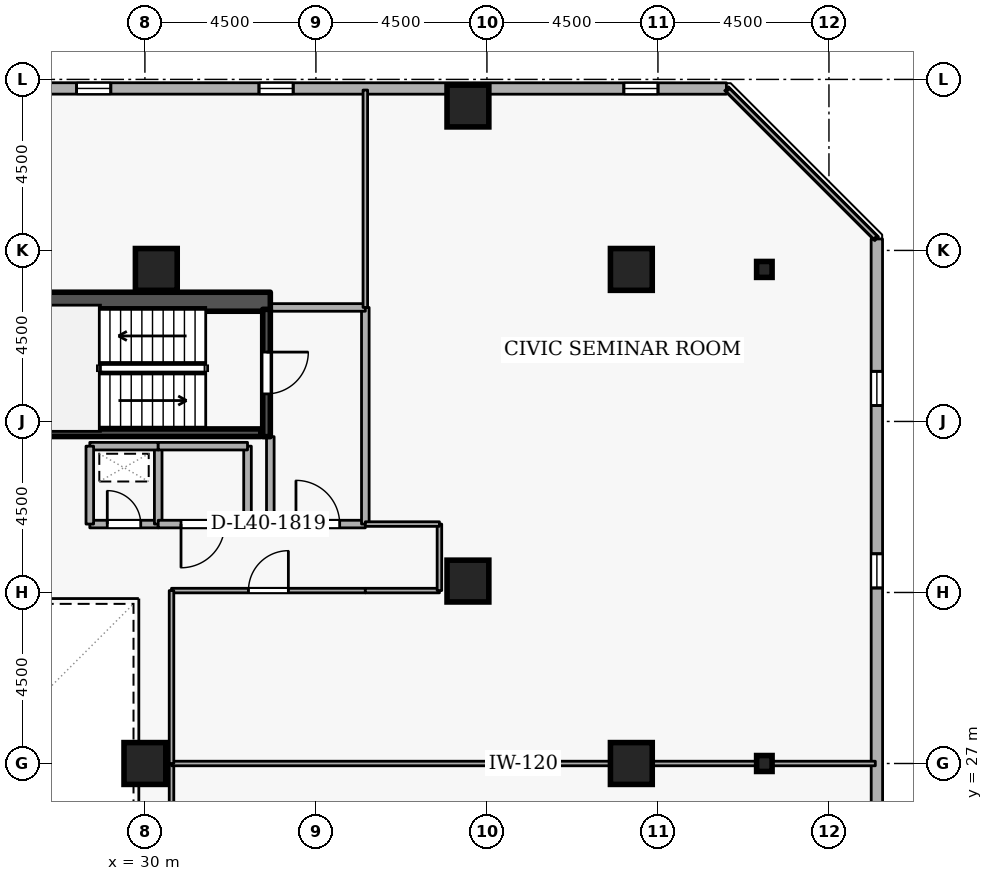
"""IFC4 building model, lengths in metres.
Left out: names, types, materials, properties, quantities, classifications, styles, units other than length and angle.
Written with IfcOpenShell. Run it as: python <this file> out.ifc"""

import sys

from ifc_helpers import new_model, si_unit, direction, frame, frame_2d, origin, origin_2d, place, context, subcontext, project, spatial, rectangle, i_section, extrude, element, fill, save


model = new_model("IFC4")
c1 = context("Model", 3, precision=1e-05, world=origin(), true_north=direction((0.0, 1.0)))
c2 = subcontext(c1, "Body", "Model", "MODEL_VIEW")
j1 = project(units=[si_unit("LENGTHUNIT", "METRE"), si_unit("PLANEANGLEUNIT", "RADIAN")], contexts=[c1])
p1 = place(None, origin())
s1 = spatial("IfcSite", under=j1, at=p1, CompositionType="ELEMENT")
p2 = place(p1, origin())
s2 = spatial("IfcBuilding", under=s1, at=p2, CompositionType="ELEMENT")
p3 = place(p2, frame((0.0, 0.0, 152.7)))
s3 = spatial("IfcBuildingStorey", under=s2, at=p3, CompositionType="ELEMENT", Elevation=152.7)
p4 = place(p3, frame((17.7, 39.15, 0.0), z_axis=(0.0, 0.0, 1.0), x_axis=(1.0, 0.0, 0.0)))
e1 = element("IfcWall", 1, at=p4, inside=s3, PredefinedType="SHEAR", context=c2, shape_type="SweptSolid", body=[
    extrude(rectangle(XDim=15.6, YDim=0.5, at=frame_2d((7.8, 0.0))), origin(), (0.0, 0.0, 1.0), 3.6),
])
for number, where, z_axis, x_axis in (
    (2, (42.8, 27.0, 0.0), (0.0, 0.0, 1.0), (1.0, 0.0, 0.0)),
    (3, (42.8, 40.0, 0.0), (0.0, 0.0, 1.0), (1.0, 0.0, 0.0)),
    (4, (38.5, 44.3, 0.0), (0.0, 0.0, 1.0), (1.0, 0.0, 0.0)),
    (5, (38.5, 31.8, 0.0), (0.0, 0.0, 1.0), (1.0, 0.0, 0.0)),
    (6, (30.3, 40.0, 0.0), (0.0, 0.0, 1.0), (1.0, 0.0, 0.0)),
    (7, (30.0, 27.0, 0.0), (0.0, 0.0, 1.0), (1.0, 0.0, 0.0)),
):
    element("IfcColumn", number, at=place(p3, frame(where, z_axis=z_axis, x_axis=x_axis)), inside=s3, PredefinedType="COLUMN", context=c2, shape_type="SweptSolid", body=[
        extrude(rectangle(XDim=1.1, YDim=1.1, at=origin_2d()), origin(), (0.0, 0.0, 1.0), 3.6),
    ])
for number, where, z_axis, x_axis in (
    (8, (46.3, 27.0, 0.0), (0.0, 0.0, 1.0), (1.0, 0.0, 0.0)),
    (9, (46.3, 40.0, 0.0), (0.0, 0.0, 1.0), (1.0, 0.0, 0.0)),
):
    element("IfcColumn", number, at=place(p3, frame(where, z_axis=z_axis, x_axis=x_axis)), inside=s3, PredefinedType="COLUMN", context=c2, shape_type="SweptSolid", body=[
        extrude(i_section(OverallWidth=0.407, OverallDepth=0.419, WebThickness=0.031, FlangeThickness=0.049, FilletRadius=0.015, at=origin_2d()), origin(), (0.0, 0.0, 1.0), 3.6),
    ])
p5 = place(p3, frame((49.265, 5.819, 0.0), z_axis=(0.0, 0.0, 1.0), x_axis=(-0.000132597301, 0.999999991209, 0.0)))
e10 = element("IfcWall", 10, at=p5, inside=s3, PredefinedType="STANDARD", context=c2, shape_type="SweptSolid", body=[
    extrude(rectangle(XDim=34.983, YDim=0.3, at=frame_2d((17.492, 0.0))), origin(), (0.0, 0.0, 1.0), 2.7),
])
p6 = place(p5, frame((1.8, 0.0, 0.72)))
e11 = element("IfcOpeningElement", 11, at=p6, cuts=e10, PredefinedType="OPENING", context=c2, shape_type="SweptSolid", body=[
    extrude(rectangle(XDim=0.9, YDim=1.75, at=frame_2d((0.45, 0.875))), frame((0.0, 0.16, 0.0), z_axis=(0.0, -1.0, 0.0), x_axis=(1.0, 0.0, 0.0)), (0.0, 0.0, 1.0), 0.32),
])
p7 = place(p5, frame((6.6, 0.0, 0.72)))
e12 = element("IfcOpeningElement", 12, at=p7, cuts=e10, PredefinedType="OPENING", context=c2, shape_type="SweptSolid", body=[
    extrude(rectangle(XDim=0.9, YDim=1.75, at=frame_2d((0.45, 0.875))), frame((0.0, 0.16, 0.0), z_axis=(0.0, -1.0, 0.0), x_axis=(1.0, 0.0, 0.0)), (0.0, 0.0, 1.0), 0.32),
])
p8 = place(p5, frame((11.4, 0.0, 0.72)))
e13 = element("IfcOpeningElement", 13, at=p8, cuts=e10, PredefinedType="OPENING", context=c2, shape_type="SweptSolid", body=[
    extrude(rectangle(XDim=0.9, YDim=1.75, at=frame_2d((0.45, 0.875))), frame((0.0, 0.16, 0.0), z_axis=(0.0, -1.0, 0.0), x_axis=(1.0, 0.0, 0.0)), (0.0, 0.0, 1.0), 0.32),
])
p9 = place(p5, frame((16.2, 0.0, 0.72)))
e14 = element("IfcOpeningElement", 14, at=p9, cuts=e10, PredefinedType="OPENING", context=c2, shape_type="SweptSolid", body=[
    extrude(rectangle(XDim=0.9, YDim=1.75, at=frame_2d((0.45, 0.875))), frame((0.0, 0.16, 0.0), z_axis=(0.0, -1.0, 0.0), x_axis=(1.0, 0.0, 0.0)), (0.0, 0.0, 1.0), 0.32),
])
p10 = place(p5, frame((25.8, 0.0, 0.72)))
e15 = element("IfcOpeningElement", 15, at=p10, cuts=e10, PredefinedType="OPENING", context=c2, shape_type="SweptSolid", body=[
    extrude(rectangle(XDim=0.9, YDim=1.75, at=frame_2d((0.45, 0.875))), frame((0.0, 0.16, 0.0), z_axis=(0.0, -1.0, 0.0), x_axis=(1.0, 0.0, 0.0)), (0.0, 0.0, 1.0), 0.32),
])
p11 = place(p5, frame((30.6, 0.0, 0.72)))
e16 = element("IfcOpeningElement", 16, at=p11, cuts=e10, PredefinedType="OPENING", context=c2, shape_type="SweptSolid", body=[
    extrude(rectangle(XDim=0.9, YDim=1.75, at=frame_2d((0.45, 0.875))), frame((0.0, 0.16, 0.0), z_axis=(0.0, -1.0, 0.0), x_axis=(1.0, 0.0, 0.0)), (0.0, 0.0, 1.0), 0.32),
])
p12 = place(p3, frame((45.302, 44.76, 0.0), z_axis=(0.0, 0.0, 1.0), x_axis=(-0.999999991209, 0.000132597301, 0.0)))
e17 = element("IfcWall", 17, at=p12, inside=s3, PredefinedType="STANDARD", context=c2, shape_type="SweptSolid", body=[
    extrude(rectangle(XDim=34.983, YDim=0.3, at=frame_2d((17.492, 0.0))), origin(), (0.0, 0.0, 1.0), 2.7),
])
p13 = place(p12, frame((1.8, 0.0, 0.72)))
e18 = element("IfcOpeningElement", 18, at=p13, cuts=e17, PredefinedType="OPENING", context=c2, shape_type="SweptSolid", body=[
    extrude(rectangle(XDim=0.9, YDim=1.75, at=frame_2d((0.45, 0.875))), frame((0.0, 0.16, 0.0), z_axis=(0.0, -1.0, 0.0), x_axis=(1.0, 0.0, 0.0)), (0.0, 0.0, 1.0), 0.32),
])
p14 = place(p12, frame((11.4, 0.0, 0.72)))
e19 = element("IfcOpeningElement", 19, at=p14, cuts=e17, PredefinedType="OPENING", context=c2, shape_type="SweptSolid", body=[
    extrude(rectangle(XDim=0.9, YDim=1.75, at=frame_2d((0.45, 0.875))), frame((0.0, 0.16, 0.0), z_axis=(0.0, -1.0, 0.0), x_axis=(1.0, 0.0, 0.0)), (0.0, 0.0, 1.0), 0.32),
])
p15 = place(p12, frame((16.2, 0.0, 0.72)))
e20 = element("IfcOpeningElement", 20, at=p15, cuts=e17, PredefinedType="OPENING", context=c2, shape_type="SweptSolid", body=[
    extrude(rectangle(XDim=0.9, YDim=1.75, at=frame_2d((0.45, 0.875))), frame((0.0, 0.16, 0.0), z_axis=(0.0, -1.0, 0.0), x_axis=(1.0, 0.0, 0.0)), (0.0, 0.0, 1.0), 0.32),
])
p16 = place(p12, frame((21.0, 0.0, 0.72)))
e21 = element("IfcOpeningElement", 21, at=p16, cuts=e17, PredefinedType="OPENING", context=c2, shape_type="SweptSolid", body=[
    extrude(rectangle(XDim=0.9, YDim=1.75, at=frame_2d((0.45, 0.875))), frame((0.0, 0.16, 0.0), z_axis=(0.0, -1.0, 0.0), x_axis=(1.0, 0.0, 0.0)), (0.0, 0.0, 1.0), 0.32),
])
p17 = place(p12, frame((25.8, 0.0, 0.72)))
e22 = element("IfcOpeningElement", 22, at=p17, cuts=e17, PredefinedType="OPENING", context=c2, shape_type="SweptSolid", body=[
    extrude(rectangle(XDim=0.9, YDim=1.75, at=frame_2d((0.45, 0.875))), frame((0.0, 0.16, 0.0), z_axis=(0.0, -1.0, 0.0), x_axis=(1.0, 0.0, 0.0)), (0.0, 0.0, 1.0), 0.32),
])
p18 = place(p12, frame((30.6, 0.0, 0.72)))
e23 = element("IfcOpeningElement", 23, at=p18, cuts=e17, PredefinedType="OPENING", context=c2, shape_type="SweptSolid", body=[
    extrude(rectangle(XDim=0.9, YDim=1.75, at=frame_2d((0.45, 0.875))), frame((0.0, 0.16, 0.0), z_axis=(0.0, -1.0, 0.0), x_axis=(1.0, 0.0, 0.0)), (0.0, 0.0, 1.0), 0.32),
])
p19 = place(p3, frame((33.2, 38.95, 0.0), z_axis=(0.0, 0.0, 1.0), x_axis=(0.0, -1.0, 0.0)))
e24 = element("IfcWall", 24, at=p19, inside=s3, PredefinedType="SHEAR", context=c2, shape_type="SweptSolid", body=[
    extrude(rectangle(XDim=3.35, YDim=0.2, at=frame_2d((1.675, 0.0))), origin(), (0.0, 0.0, 1.0), 3.6),
])
p20 = place(p19, frame((1.125, 0.0, 0.0)))
e25 = element("IfcOpeningElement", 25, at=p20, cuts=e24, PredefinedType="OPENING", context=c2, shape_type="SweptSolid", body=[
    extrude(rectangle(XDim=1.1, YDim=2.1, at=frame_2d((0.55, 1.05))), frame((0.0, 0.11, 0.0), z_axis=(0.0, -1.0, 0.0), x_axis=(1.0, 0.0, 0.0)), (0.0, 0.0, 1.0), 0.22),
])
p21 = place(p3, frame((25.95, 35.703, 0.0), z_axis=(0.0, 0.0, 1.0), x_axis=(1.0, 0.0, 0.0)))
e26 = element("IfcWall", 26, at=p21, inside=s3, PredefinedType="SHEAR", context=c2, shape_type="SweptSolid", body=[
    extrude(rectangle(XDim=7.1, YDim=0.2, at=frame_2d((3.55, 0.0))), origin(), (0.0, 0.0, 1.0), 3.6),
])
p22 = place(p3, frame((33.3, 33.3, 0.0), z_axis=(0.0, 0.0, 1.0), x_axis=(1.0, 0.0, 0.0)))
e27 = element("IfcWall", 27, at=p22, inside=s3, PredefinedType="STANDARD", context=c2, shape_type="SweptSolid", body=[
    extrude(rectangle(XDim=2.5, YDim=0.2, at=frame_2d((1.25, 0.0))), origin(), (0.0, 0.0, 1.0), 3.34),
])
p23 = place(p22, frame((0.675, 0.0, 0.0)))
e28 = element("IfcOpeningElement", 28, at=p23, cuts=e27, PredefinedType="OPENING", context=c2, shape_type="SweptSolid", body=[
    extrude(rectangle(XDim=1.15, YDim=2.1, at=frame_2d((0.575, 1.05))), frame((0.0, 0.11, 0.0), z_axis=(0.0, -1.0, 0.0), x_axis=(1.0, 0.0, 0.0)), (0.0, 0.0, 1.0), 0.22),
])
p24 = place(p3, frame((35.8, 33.3, 0.0), z_axis=(0.0, 0.0, 1.0), x_axis=(0.0, 1.0, 0.0)))
e29 = element("IfcWall", 29, at=p24, inside=s3, PredefinedType="STANDARD", context=c2, shape_type="SweptSolid", body=[
    extrude(rectangle(XDim=5.7, YDim=0.2, at=frame_2d((2.85, 0.0))), origin(), (0.0, 0.0, 1.0), 3.34),
])
p25 = place(p3, frame((35.8, 39.0, 0.0), z_axis=(0.0, 0.0, 1.0), x_axis=(-1.0, 0.0, 0.0)))
e30 = element("IfcWall", 30, at=p25, inside=s3, PredefinedType="STANDARD", context=c2, shape_type="SweptSolid", body=[
    extrude(rectangle(XDim=2.5, YDim=0.2, at=frame_2d((1.25, 0.0))), origin(), (0.0, 0.0, 1.0), 3.34),
])
p26 = place(p3, frame((33.3, 35.6, 0.0), z_axis=(0.0, 0.0, 1.0), x_axis=(0.0, -1.0, 0.0)))
e31 = element("IfcWall", 31, at=p26, inside=s3, PredefinedType="STANDARD", context=c2, shape_type="SweptSolid", body=[
    extrude(rectangle(XDim=2.3, YDim=0.2, at=frame_2d((1.15, 0.0))), origin(), (0.0, 0.0, 1.0), 2.545),
])
p27 = place(p3, frame((28.55, 33.3, 0.0), z_axis=(0.0, 0.0, 1.0), x_axis=(1.0, 0.0, 0.0)))
e32 = element("IfcWall", 32, at=p27, inside=s3, PredefinedType="STANDARD", context=c2, shape_type="SweptSolid", body=[
    extrude(rectangle(XDim=1.8, YDim=0.2, at=frame_2d((0.9, 0.0))), origin(), (0.0, 0.0, 1.0), 3.34),
])
p28 = place(p27, frame((0.46, 0.0, 0.0)))
e33 = element("IfcOpeningElement", 33, at=p28, cuts=e32, PredefinedType="OPENING", context=c2, shape_type="SweptSolid", body=[
    extrude(rectangle(XDim=0.88, YDim=2.04, at=frame_2d((0.44, 1.02))), frame((0.0, 0.11, 0.0), z_axis=(0.0, -1.0, 0.0), x_axis=(1.0, 0.0, 0.0)), (0.0, 0.0, 1.0), 0.22),
])
p29 = place(p3, frame((30.35, 33.3, 0.0), z_axis=(0.0, 0.0, 1.0), x_axis=(0.0, 1.0, 0.0)))
e34 = element("IfcWall", 34, at=p29, inside=s3, PredefinedType="STANDARD", context=c2, shape_type="SweptSolid", body=[
    extrude(rectangle(XDim=2.05, YDim=0.2, at=frame_2d((1.025, 0.0))), origin(), (0.0, 0.0, 1.0), 3.34),
])
p30 = place(p3, frame((30.35, 35.35, 0.0), z_axis=(0.0, 0.0, 1.0), x_axis=(-1.0, 0.0, 0.0)))
e35 = element("IfcWall", 35, at=p30, inside=s3, PredefinedType="STANDARD", context=c2, shape_type="SweptSolid", body=[
    extrude(rectangle(XDim=1.8, YDim=0.2, at=frame_2d((0.9, 0.0))), origin(), (0.0, 0.0, 1.0), 3.34),
])
p31 = place(p3, frame((28.55, 35.35, 0.0), z_axis=(0.0, 0.0, 1.0), x_axis=(0.0, -1.0, 0.0)))
e36 = element("IfcWall", 36, at=p31, inside=s3, PredefinedType="STANDARD", context=c2, shape_type="SweptSolid", body=[
    extrude(rectangle(XDim=2.05, YDim=0.2, at=frame_2d((1.025, 0.0))), origin(), (0.0, 0.0, 1.0), 3.34),
])
p32 = place(p3, frame((32.7, 35.35, 0.0), z_axis=(0.0, 0.0, 1.0), x_axis=(0.0, -1.0, 0.0)))
e37 = element("IfcWall", 37, at=p32, inside=s3, PredefinedType="STANDARD", context=c2, shape_type="SweptSolid", body=[
    extrude(rectangle(XDim=2.05, YDim=0.2, at=frame_2d((1.025, 0.0))), origin(), (0.0, 0.0, 1.0), 2.545),
])
p33 = place(p3, frame((32.7, 33.3, 0.0), z_axis=(0.0, 0.0, 1.0), x_axis=(-1.0, 0.0, 0.0)))
e38 = element("IfcWall", 38, at=p33, inside=s3, PredefinedType="STANDARD", context=c2, shape_type="SweptSolid", body=[
    extrude(rectangle(XDim=2.35, YDim=0.2, at=frame_2d((1.175, 0.0))), origin(), (0.0, 0.0, 1.0), 3.34),
])
p34 = place(p33, frame((0.6, 0.0, 0.0)))
e39 = element("IfcOpeningElement", 39, at=p34, cuts=e38, PredefinedType="OPENING", context=c2, shape_type="SweptSolid", body=[
    extrude(rectangle(XDim=1.15, YDim=2.1, at=frame_2d((0.575, 1.05))), frame((0.0, 0.11, 0.0), z_axis=(0.0, -1.0, 0.0), x_axis=(1.0, 0.0, 0.0)), (0.0, 0.0, 1.0), 0.22),
])
p35 = place(p3, frame((30.35, 35.35, 0.0), z_axis=(0.0, 0.0, 1.0), x_axis=(1.0, 0.0, 0.0)))
e40 = element("IfcWall", 40, at=p35, inside=s3, PredefinedType="STANDARD", context=c2, shape_type="SweptSolid", body=[
    extrude(rectangle(XDim=2.35, YDim=0.2, at=frame_2d((1.175, 0.0))), origin(), (0.0, 0.0, 1.0), 3.34),
])
p36 = place(p3, frame((30.7, 22.45, 0.0), z_axis=(0.0, 0.0, 1.0), x_axis=(0.0, 1.0, 0.0)))
e41 = element("IfcWall", 41, at=p36, inside=s3, PredefinedType="PARTITIONING", context=c2, shape_type="SweptSolid", body=[
    extrude(rectangle(XDim=4.55, YDim=0.12, at=frame_2d((2.275, 0.0))), origin(), (0.0, 0.0, 1.0), 3.34),
])
p37 = place(p3, frame((30.7, 27.0, 0.0), z_axis=(0.0, 0.0, 1.0), x_axis=(1.0, 0.0, 0.0)))
e42 = element("IfcWall", 42, at=p37, inside=s3, PredefinedType="PARTITIONING", context=c2, shape_type="SweptSolid", body=[
    extrude(rectangle(XDim=18.52, YDim=0.12, at=frame_2d((9.26, 0.0))), origin(), (0.0, 0.0, 1.0), 2.932),
])
p38 = place(p3, frame((30.7, 31.55, 0.0), z_axis=(0.0, 0.0, 1.0), x_axis=(1.0, 0.0, 0.0)))
e43 = element("IfcWall", 43, at=p38, inside=s3, PredefinedType="PARTITIONING", context=c2, shape_type="SweptSolid", body=[
    extrude(rectangle(XDim=5.1, YDim=0.12, at=frame_2d((2.55, 0.0))), origin(), (0.0, 0.0, 1.0), 3.34),
])
p39 = place(p38, frame((2.025, 0.0, 0.0)))
e44 = element("IfcOpeningElement", 44, at=p39, cuts=e43, PredefinedType="OPENING", context=c2, shape_type="SweptSolid", body=[
    extrude(rectangle(XDim=1.05, YDim=2.1, at=frame_2d((0.525, 1.05))), frame((0.0, 0.07, 0.0), z_axis=(0.0, -1.0, 0.0), x_axis=(1.0, 0.0, 0.0)), (0.0, 0.0, 1.0), 0.14),
])
p40 = place(p3, frame((35.8, 31.55, 0.0), z_axis=(0.0, 0.0, 1.0), x_axis=(1.0, 0.0, 0.0)))
e45 = element("IfcWall", 45, at=p40, inside=s3, PredefinedType="PARTITIONING", context=c2, shape_type="SweptSolid", body=[
    extrude(rectangle(XDim=1.95, YDim=0.12, at=frame_2d((0.975, 0.0))), origin(), (0.0, 0.0, 1.0), 3.34),
])
p41 = place(p3, frame((37.75, 31.55, 0.0), z_axis=(0.0, 0.0, 1.0), x_axis=(0.0, 1.0, 0.0)))
e46 = element("IfcWall", 46, at=p41, inside=s3, PredefinedType="PARTITIONING", context=c2, shape_type="SweptSolid", body=[
    extrude(rectangle(XDim=1.75, YDim=0.12, at=frame_2d((0.875, 0.0))), origin(), (0.0, 0.0, 1.0), 3.34),
])
p42 = place(p3, frame((37.75, 33.3, 0.0), z_axis=(0.0, 0.0, 1.0), x_axis=(-1.0, 0.0, 0.0)))
e47 = element("IfcWall", 47, at=p42, inside=s3, PredefinedType="PARTITIONING", context=c2, shape_type="SweptSolid", body=[
    extrude(rectangle(XDim=1.95, YDim=0.12, at=frame_2d((0.975, 0.0))), origin(), (0.0, 0.0, 1.0), 3.34),
])
p43 = place(p3, frame((35.8, 39.0, 0.0), z_axis=(0.0, 0.0, 1.0), x_axis=(0.0, 1.0, 0.0)))
e48 = element("IfcWall", 48, at=p43, inside=s3, PredefinedType="PARTITIONING", context=c2, shape_type="SweptSolid", body=[
    extrude(rectangle(XDim=5.72, YDim=0.12, at=frame_2d((2.86, 0.0))), origin(), (0.0, 0.0, 1.0), 3.34),
])
p44 = place(p3, frame((45.34, 44.72, 0.0), z_axis=(0.0, 0.0, 1.0), x_axis=(0.707106781187, -0.707106781187, 0.0)))
e49 = element("IfcWall", 49, at=p44, inside=s3, PredefinedType="PARTITIONING", context=c2, shape_type="SweptSolid", body=[
    extrude(rectangle(XDim=5.487, YDim=0.12, at=frame_2d((2.743, 0.0))), origin(), (0.0, 0.0, 1.0), 3.34),
])
p45 = place(p3, frame((30.7, 27.0, 0.0), z_axis=(0.0, 0.0, 1.0), x_axis=(0.0, 1.0, 0.0)))
e50 = element("IfcWall", 50, at=p45, inside=s3, PredefinedType="PARTITIONING", context=c2, shape_type="SweptSolid", body=[
    extrude(rectangle(XDim=4.55, YDim=0.12, at=frame_2d((2.275, 0.0))), origin(), (0.0, 0.0, 1.0), 3.34),
])
p46 = place(p10, origin())
e51 = element("IfcWindow", 51, at=p46, inside=s3, PartitioningType="SINGLE_PANEL", PredefinedType="WINDOW", context=c2, shape_type="SweptSolid", body=[
    extrude(rectangle(XDim=0.9, YDim=1.75, at=frame_2d((0.45, 0.875))), frame((0.0, 0.03, 0.0), z_axis=(0.0, -1.0, 0.0), x_axis=(1.0, 0.0, 0.0)), (0.0, 0.0, 1.0), 0.06),
])
fill(e15, e51)
p47 = place(p11, origin())
e52 = element("IfcWindow", 52, at=p47, inside=s3, PartitioningType="SINGLE_PANEL", PredefinedType="WINDOW", context=c2, shape_type="SweptSolid", body=[
    extrude(rectangle(XDim=0.9, YDim=1.75, at=frame_2d((0.45, 0.875))), frame((0.0, 0.03, 0.0), z_axis=(0.0, -1.0, 0.0), x_axis=(1.0, 0.0, 0.0)), (0.0, 0.0, 1.0), 0.06),
])
fill(e16, e52)
p48 = place(p13, origin())
e53 = element("IfcWindow", 53, at=p48, inside=s3, PartitioningType="SINGLE_PANEL", PredefinedType="WINDOW", context=c2, shape_type="SweptSolid", body=[
    extrude(rectangle(XDim=0.9, YDim=1.75, at=frame_2d((0.45, 0.875))), frame((0.0, 0.03, 0.0), z_axis=(0.0, -1.0, 0.0), x_axis=(1.0, 0.0, 0.0)), (0.0, 0.0, 1.0), 0.06),
])
fill(e18, e53)
p49 = place(p14, origin())
e54 = element("IfcWindow", 54, at=p49, inside=s3, PartitioningType="SINGLE_PANEL", PredefinedType="WINDOW", context=c2, shape_type="SweptSolid", body=[
    extrude(rectangle(XDim=0.9, YDim=1.75, at=frame_2d((0.45, 0.875))), frame((0.0, 0.03, 0.0), z_axis=(0.0, -1.0, 0.0), x_axis=(1.0, 0.0, 0.0)), (0.0, 0.0, 1.0), 0.06),
])
fill(e19, e54)
p50 = place(p15, origin())
e55 = element("IfcWindow", 55, at=p50, inside=s3, PartitioningType="SINGLE_PANEL", PredefinedType="WINDOW", context=c2, shape_type="SweptSolid", body=[
    extrude(rectangle(XDim=0.9, YDim=1.75, at=frame_2d((0.45, 0.875))), frame((0.0, 0.03, 0.0), z_axis=(0.0, -1.0, 0.0), x_axis=(1.0, 0.0, 0.0)), (0.0, 0.0, 1.0), 0.06),
])
fill(e20, e55)
p51 = place(p20, origin())
e56 = element("IfcDoor", 56, at=p51, inside=s3, OperationType="SINGLE_SWING_LEFT", PredefinedType="DOOR", context=c2, shape_type="SweptSolid", body=[
    extrude(rectangle(XDim=1.1, YDim=2.1, at=frame_2d((0.55, 1.05))), frame((0.0, 0.025, 0.0), z_axis=(0.0, -1.0, 0.0), x_axis=(1.0, 0.0, 0.0)), (0.0, 0.0, 1.0), 0.05),
])
fill(e25, e56)
p52 = place(p23, origin())
e57 = element("IfcDoor", 57, at=p52, inside=s3, OperationType="SINGLE_SWING_LEFT", PredefinedType="DOOR", context=c2, shape_type="SweptSolid", body=[
    extrude(rectangle(XDim=1.15, YDim=2.1, at=frame_2d((0.575, 1.05))), frame((0.0, 0.025, 0.0), z_axis=(0.0, -1.0, 0.0), x_axis=(1.0, 0.0, 0.0)), (0.0, 0.0, 1.0), 0.05),
])
fill(e28, e57)
p53 = place(p28, origin())
e58 = element("IfcDoor", 58, at=p53, inside=s3, OperationType="SINGLE_SWING_LEFT", PredefinedType="DOOR", context=c2, shape_type="SweptSolid", body=[
    extrude(rectangle(XDim=0.88, YDim=2.04, at=frame_2d((0.44, 1.02))), frame((0.0, 0.025, 0.0), z_axis=(0.0, -1.0, 0.0), x_axis=(1.0, 0.0, 0.0)), (0.0, 0.0, 1.0), 0.05),
])
fill(e33, e58)
p54 = place(p34, origin())
e59 = element("IfcDoor", 59, at=p54, inside=s3, OperationType="SINGLE_SWING_RIGHT", PredefinedType="DOOR", context=c2, shape_type="SweptSolid", body=[
    extrude(rectangle(XDim=1.15, YDim=2.1, at=frame_2d((0.575, 1.05))), frame((0.0, 0.025, 0.0), z_axis=(0.0, -1.0, 0.0), x_axis=(1.0, 0.0, 0.0)), (0.0, 0.0, 1.0), 0.05),
])
fill(e39, e59)
p55 = place(p39, origin())
e60 = element("IfcDoor", 60, at=p55, inside=s3, OperationType="SINGLE_SWING_RIGHT", PredefinedType="DOOR", context=c2, shape_type="SweptSolid", body=[
    extrude(rectangle(XDim=1.05, YDim=2.1, at=frame_2d((0.525, 1.05))), frame((0.0, 0.025, 0.0), z_axis=(0.0, -1.0, 0.0), x_axis=(1.0, 0.0, 0.0)), (0.0, 0.0, 1.0), 0.05),
])
fill(e44, e60)
save(model, sys.argv[1])
